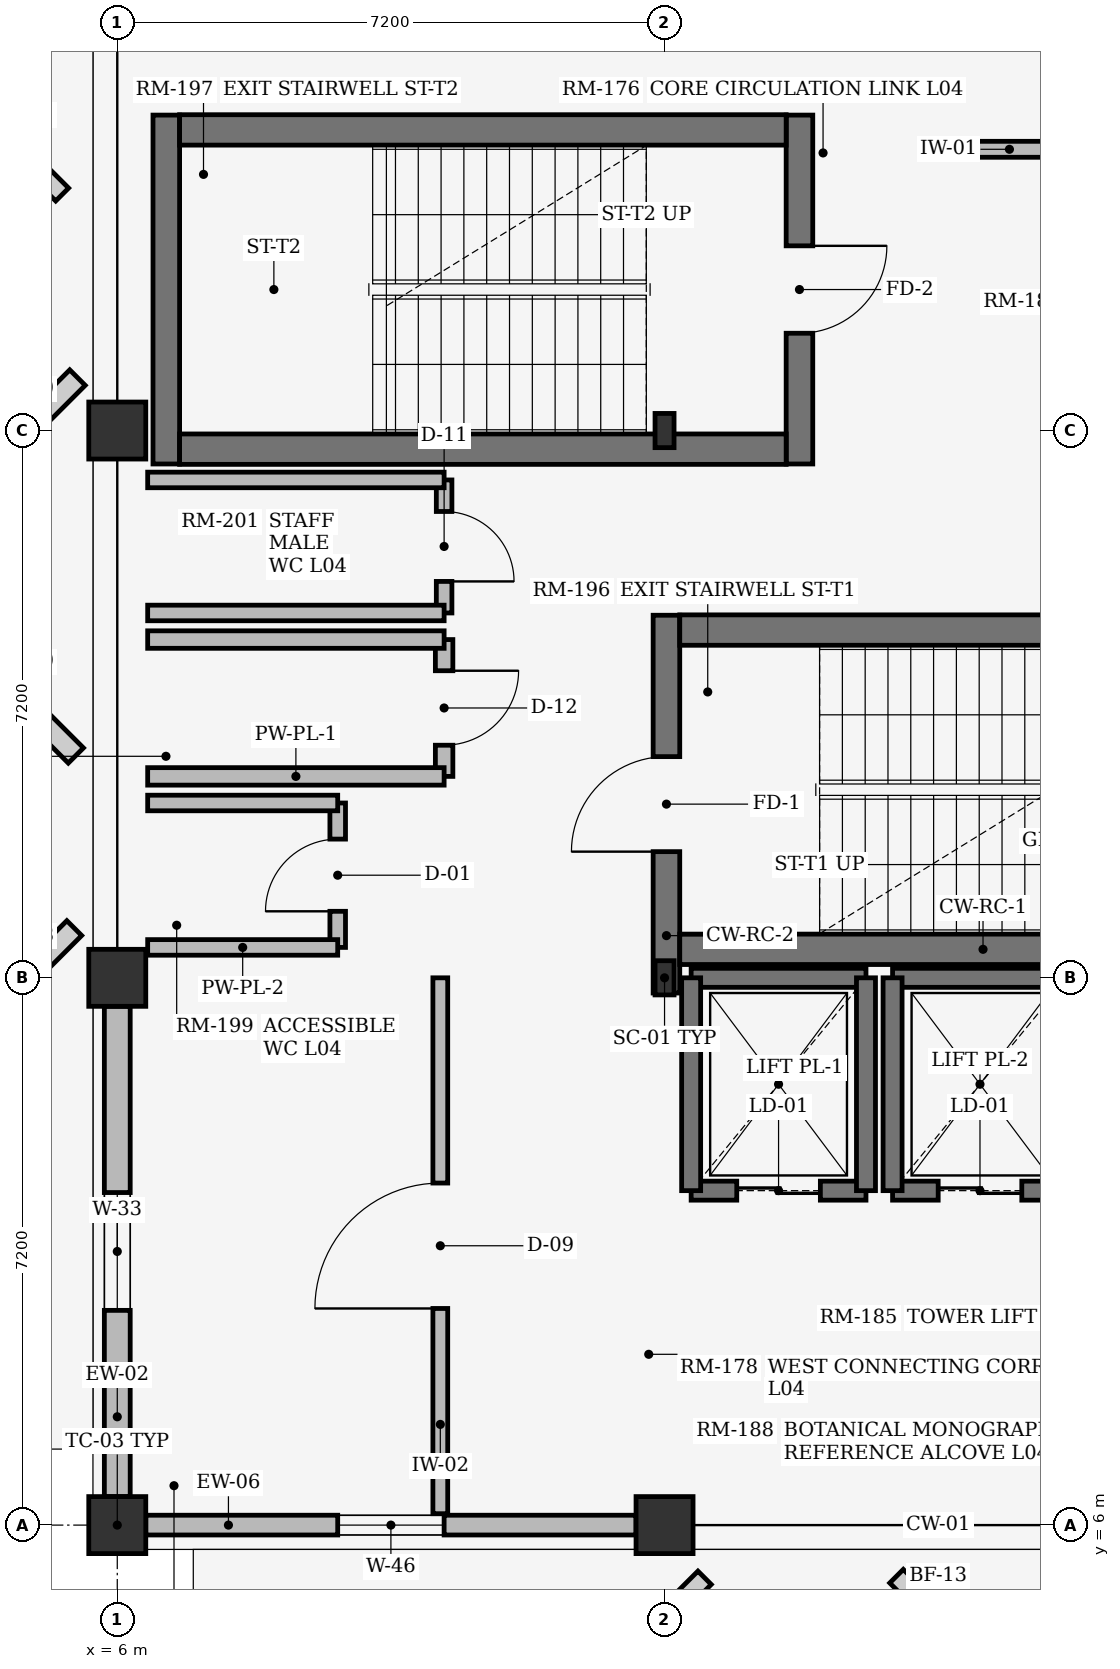
"""IFC4 building model, lengths in metres.
Left out: names, types, materials, properties, quantities, classifications, styles, units other than length and angle.
Written with IfcOpenShell. Run it as: python <this file> out.ifc"""

import sys

from ifc_helpers import new_model, si_unit, direction, frame, frame_2d, origin, origin_2d, place, context, subcontext, project, spatial, rectangle, i_section, extrude, element, fill, save


model = new_model("IFC4")
c1 = context("Model", 3, precision=1e-05, world=origin(), true_north=direction((0.0, 1.0)))
c2 = subcontext(c1, "Body", "Model", "MODEL_VIEW")
j1 = project(units=[si_unit("LENGTHUNIT", "METRE"), si_unit("PLANEANGLEUNIT", "RADIAN")], contexts=[c1])
p1 = place(None, origin())
s1 = spatial("IfcSite", under=j1, at=p1, CompositionType="ELEMENT")
p2 = place(p1, origin())
s2 = spatial("IfcBuilding", under=s1, at=p2, CompositionType="ELEMENT")
p3 = place(p2, frame((0.0, 0.0, 17.1)))
s3 = spatial("IfcBuildingStorey", under=s2, at=p3, CompositionType="ELEMENT", Elevation=17.1)
for number, where, z_axis, x_axis in (
    (1, (6.0, 6.0, 0.0), (0.0, 0.0, 1.0), (1.0, 0.0, 0.0)),
    (2, (6.0, 13.2, 0.0), (0.0, 0.0, 1.0), (1.0, 0.0, 0.0)),
    (3, (6.0, 20.4, 0.0), (0.0, 0.0, 1.0), (1.0, 0.0, 0.0)),
    (4, (13.2, 6.0, 0.0), (0.0, 0.0, 1.0), (1.0, 0.0, 0.0)),
):
    element("IfcColumn", number, at=place(p3, frame(where, z_axis=z_axis, x_axis=x_axis)), inside=s3, PredefinedType="COLUMN", context=c2, shape_type="SweptSolid", body=[
        extrude(rectangle(XDim=0.75, YDim=0.75, at=origin_2d()), origin(), (0.0, 0.0, 1.0), 3.66),
    ])
for number, where, z_axis, x_axis in (
    (5, (13.2, 13.2, 0.0), (0.0, 0.0, 1.0), (1.0, 0.0, 0.0)),
    (6, (13.2, 20.4, 0.0), (0.0, 0.0, 1.0), (1.0, 0.0, 0.0)),
):
    element("IfcColumn", number, at=place(p3, frame(where, z_axis=z_axis, x_axis=x_axis)), inside=s3, PredefinedType="COLUMN", context=c2, shape_type="SweptSolid", body=[
        extrude(i_section(OverallWidth=0.25, OverallDepth=0.45, WebThickness=0.011, FlangeThickness=0.014, at=origin_2d()), origin(), (0.0, 0.0, 1.0), 3.66),
    ])
p4 = place(p3, frame((6.375, 6.0, 0.0), z_axis=(0.0, 0.0, 1.0), x_axis=(1.0, 0.0, 0.0)))
e7 = element("IfcWall", 7, at=p4, inside=s3, PredefinedType="STANDARD", context=c2, shape_type="SweptSolid", body=[
    extrude(rectangle(XDim=6.45, YDim=0.26, at=frame_2d((3.225, 0.0))), origin(), (0.0, 0.0, 1.0), 3.04),
])
p5 = place(p4, frame((2.525, 0.0, 0.75)))
e8 = element("IfcOpeningElement", 8, at=p5, cuts=e7, PredefinedType="OPENING", context=c2, shape_type="SweptSolid", body=[
    extrude(rectangle(XDim=1.4, YDim=1.25, at=frame_2d((0.7, 0.625))), frame((0.0, 0.14, 0.0), z_axis=(0.0, -1.0, 0.0), x_axis=(1.0, 0.0, 0.0)), (0.0, 0.0, 1.0), 0.28),
])
p6 = place(p3, frame((6.0, 6.375, 0.0), z_axis=(0.0, 0.0, 1.0), x_axis=(0.0, 1.0, 0.0)))
e9 = element("IfcWall", 9, at=p6, inside=s3, PredefinedType="STANDARD", context=c2, shape_type="SweptSolid", body=[
    extrude(rectangle(XDim=6.45, YDim=0.34, at=frame_2d((3.225, 0.0))), origin(), (0.0, 0.0, 1.0), 3.04),
])
p7 = place(p6, frame((2.45, 0.0, 0.75)))
e10 = element("IfcOpeningElement", 10, at=p7, cuts=e9, PredefinedType="OPENING", context=c2, shape_type="SweptSolid", body=[
    extrude(rectangle(XDim=1.55, YDim=1.35, at=frame_2d((0.775, 0.675))), frame((0.0, 0.18, 0.0), z_axis=(0.0, -1.0, 0.0), x_axis=(1.0, 0.0, 0.0)), (0.0, 0.0, 1.0), 0.36),
])
p8 = place(p3, frame((13.225, 13.0, 0.0), z_axis=(0.0, 0.0, 1.0), x_axis=(0.0, 1.0, 0.0)))
e11 = element("IfcWall", 11, at=p8, inside=s3, PredefinedType="SHEAR", context=c2, shape_type="SweptSolid", body=[
    extrude(rectangle(XDim=4.97, YDim=0.35, at=frame_2d((2.485, 0.0))), origin(), (0.0, 0.0, 1.0), 3.66),
])
p9 = place(p8, frame((1.86, 0.0, 0.0)))
e12 = element("IfcOpeningElement", 12, at=p9, cuts=e11, PredefinedType="OPENING", context=c2, shape_type="SweptSolid", body=[
    extrude(rectangle(XDim=1.25, YDim=2.2, at=frame_2d((0.625, 1.1))), frame((0.0, 0.185, 0.0), z_axis=(0.0, -1.0, 0.0), x_axis=(1.0, 0.0, 0.0)), (0.0, 0.0, 1.0), 0.37),
])
for number, where, z_axis, x_axis in (
    (13, (13.4, 13.575, 0.0), (0.0, 0.0, 1.0), (1.0, 0.0, 0.0)),
    (14, (13.4, 17.775, 0.0), (0.0, 0.0, 1.0), (1.0, 0.0, 0.0)),
):
    element("IfcWall", number, at=place(p3, frame(where, z_axis=z_axis, x_axis=x_axis)), inside=s3, PredefinedType="SHEAR", context=c2, shape_type="SweptSolid", body=[
        extrude(rectangle(XDim=7.98, YDim=0.4, at=frame_2d((3.99, 0.0))), origin(), (0.0, 0.0, 1.0), 3.66),
    ])
p10 = place(p3, frame((14.975, 24.55, 0.0), z_axis=(0.0, 0.0, 1.0), x_axis=(0.0, -1.0, 0.0)))
e15 = element("IfcWall", 15, at=p10, inside=s3, PredefinedType="SHEAR", context=c2, shape_type="SweptSolid", body=[
    extrude(rectangle(XDim=4.59, YDim=0.35, at=frame_2d((2.295, 0.0))), origin(), (0.0, 0.0, 1.0), 3.66),
])
p11 = place(p10, frame((1.72, 0.0, 0.0)))
e16 = element("IfcOpeningElement", 16, at=p11, cuts=e15, PredefinedType="OPENING", context=c2, shape_type="SweptSolid", body=[
    extrude(rectangle(XDim=1.15, YDim=2.2, at=frame_2d((0.575, 1.1))), frame((0.0, 0.185, 0.0), z_axis=(0.0, -1.0, 0.0), x_axis=(1.0, 0.0, 0.0)), (0.0, 0.0, 1.0), 0.37),
])
p12 = place(p3, frame((6.645, 24.55, 0.0), z_axis=(0.0, 0.0, 1.0), x_axis=(0.0, -1.0, 0.0)))
e17 = element("IfcWall", 17, at=p12, inside=s3, PredefinedType="SHEAR", context=c2, shape_type="SweptSolid", body=[
    extrude(rectangle(XDim=4.59, YDim=0.35, at=frame_2d((2.295, 0.0))), origin(), (0.0, 0.0, 1.0), 3.66),
])
for number, where, z_axis, x_axis in (
    (18, (14.8, 24.355, 0.0), (0.0, 0.0, 1.0), (-1.0, 0.0, 0.0)),
    (19, (14.8, 20.155, 0.0), (0.0, 0.0, 1.0), (-1.0, 0.0, 0.0)),
):
    element("IfcWall", number, at=place(p3, frame(where, z_axis=z_axis, x_axis=x_axis)), inside=s3, PredefinedType="SHEAR", context=c2, shape_type="SweptSolid", body=[
        extrude(rectangle(XDim=7.98, YDim=0.4, at=frame_2d((3.99, 0.0))), origin(), (0.0, 0.0, 1.0), 3.66),
    ])
p13 = place(p3, frame((13.55, 10.4, 0.0), z_axis=(0.0, 0.0, 1.0), x_axis=(1.0, 0.0, 0.0)))
e20 = element("IfcWall", 20, at=p13, inside=s3, PredefinedType="SHEAR", context=c2, shape_type="SweptSolid", body=[
    extrude(rectangle(XDim=2.3, YDim=0.25, at=frame_2d((1.15, 0.0))), origin(), (0.0, 0.0, 1.0), 3.66),
])
p14 = place(p13, frame((0.6, 0.0, 0.0)))
e21 = element("IfcOpeningElement", 21, at=p14, cuts=e20, PredefinedType="OPENING", context=c2, shape_type="SweptSolid", body=[
    extrude(rectangle(XDim=1.1, YDim=2.2, at=frame_2d((0.55, 1.1))), frame((0.0, 0.135, 0.0), z_axis=(0.0, -1.0, 0.0), x_axis=(1.0, 0.0, 0.0)), (0.0, 0.0, 1.0), 0.27),
])
p15 = place(p3, frame((13.55, 13.2, 0.0), z_axis=(0.0, 0.0, 1.0), x_axis=(1.0, 0.0, 0.0)))
e22 = element("IfcWall", 22, at=p15, inside=s3, PredefinedType="SHEAR", context=c2, shape_type="SweptSolid", body=[
    extrude(rectangle(XDim=2.3, YDim=0.25, at=frame_2d((1.15, 0.0))), origin(), (0.0, 0.0, 1.0), 3.66),
])
for number, where, z_axis, x_axis in (
    (23, (13.55, 10.4, 0.0), (0.0, 0.0, 1.0), (0.0, 1.0, 0.0)),
    (24, (15.85, 10.4, 0.0), (0.0, 0.0, 1.0), (0.0, 1.0, 0.0)),
):
    element("IfcWall", number, at=place(p3, frame(where, z_axis=z_axis, x_axis=x_axis)), inside=s3, PredefinedType="SHEAR", context=c2, shape_type="SweptSolid", body=[
        extrude(rectangle(XDim=2.8, YDim=0.25, at=frame_2d((1.4, 0.0))), origin(), (0.0, 0.0, 1.0), 3.66),
    ])
p16 = place(p3, frame((16.2, 10.4, 0.0), z_axis=(0.0, 0.0, 1.0), x_axis=(1.0, 0.0, 0.0)))
e25 = element("IfcWall", 25, at=p16, inside=s3, PredefinedType="SHEAR", context=c2, shape_type="SweptSolid", body=[
    extrude(rectangle(XDim=2.3, YDim=0.25, at=frame_2d((1.15, 0.0))), origin(), (0.0, 0.0, 1.0), 3.66),
])
p17 = place(p16, frame((0.6, 0.0, 0.0)))
e26 = element("IfcOpeningElement", 26, at=p17, cuts=e25, PredefinedType="OPENING", context=c2, shape_type="SweptSolid", body=[
    extrude(rectangle(XDim=1.1, YDim=2.2, at=frame_2d((0.55, 1.1))), frame((0.0, 0.135, 0.0), z_axis=(0.0, -1.0, 0.0), x_axis=(1.0, 0.0, 0.0)), (0.0, 0.0, 1.0), 0.27),
])
p18 = place(p3, frame((16.2, 13.2, 0.0), z_axis=(0.0, 0.0, 1.0), x_axis=(1.0, 0.0, 0.0)))
e27 = element("IfcWall", 27, at=p18, inside=s3, PredefinedType="SHEAR", context=c2, shape_type="SweptSolid", body=[
    extrude(rectangle(XDim=2.3, YDim=0.25, at=frame_2d((1.15, 0.0))), origin(), (0.0, 0.0, 1.0), 3.66),
])
p19 = place(p3, frame((16.2, 10.4, 0.0), z_axis=(0.0, 0.0, 1.0), x_axis=(0.0, 1.0, 0.0)))
e28 = element("IfcWall", 28, at=p19, inside=s3, PredefinedType="SHEAR", context=c2, shape_type="SweptSolid", body=[
    extrude(rectangle(XDim=2.8, YDim=0.25, at=frame_2d((1.4, 0.0))), origin(), (0.0, 0.0, 1.0), 3.66),
])
p20 = place(p3, frame((8.9, 13.6, 0.0), z_axis=(0.0, 0.0, 1.0), x_axis=(0.0, 1.0, 0.0)))
e29 = element("IfcWall", 29, at=p20, inside=s3, PredefinedType="PLUMBINGWALL", context=c2, shape_type="SweptSolid", body=[
    extrude(rectangle(XDim=1.9, YDim=0.205, at=frame_2d((0.95, 0.0))), origin(), (0.0, 0.0, 1.0), 3.64),
])
p21 = place(p20, frame((0.475, 0.0, 0.0)))
e30 = element("IfcOpeningElement", 30, at=p21, cuts=e29, PredefinedType="OPENING", context=c2, shape_type="SweptSolid", body=[
    extrude(rectangle(XDim=0.95, YDim=2.15, at=frame_2d((0.475, 1.075))), frame((0.0, 0.113, 0.0), z_axis=(0.0, -1.0, 0.0), x_axis=(1.0, 0.0, 0.0)), (0.0, 0.0, 1.0), 0.225),
])
for number, where, z_axis, x_axis in (
    (31, (6.4, 13.6, 0.0), (0.0, 0.0, 1.0), (1.0, 0.0, 0.0)),
    (32, (6.4, 15.5, 0.0), (0.0, 0.0, 1.0), (1.0, 0.0, 0.0)),
):
    element("IfcWall", number, at=place(p3, frame(where, z_axis=z_axis, x_axis=x_axis)), inside=s3, PredefinedType="PLUMBINGWALL", context=c2, shape_type="SweptSolid", body=[
        extrude(rectangle(XDim=2.5, YDim=0.205, at=frame_2d((1.25, 0.0))), origin(), (0.0, 0.0, 1.0), 3.64),
    ])
p22 = place(p3, frame((10.3, 15.85, 0.0), z_axis=(0.0, 0.0, 1.0), x_axis=(0.0, 1.0, 0.0)))
e33 = element("IfcWall", 33, at=p22, inside=s3, PredefinedType="PLUMBINGWALL", context=c2, shape_type="SweptSolid", body=[
    extrude(rectangle(XDim=1.8, YDim=0.23, at=frame_2d((0.9, 0.0))), origin(), (0.0, 0.0, 1.0), 3.64),
])
p23 = place(p22, frame((0.41, 0.0, 0.0)))
e34 = element("IfcOpeningElement", 34, at=p23, cuts=e33, PredefinedType="OPENING", context=c2, shape_type="SweptSolid", body=[
    extrude(rectangle(XDim=0.98, YDim=2.1, at=frame_2d((0.49, 1.05))), frame((0.0, 0.125, 0.0), z_axis=(0.0, -1.0, 0.0), x_axis=(1.0, 0.0, 0.0)), (0.0, 0.0, 1.0), 0.25),
])
for number, where, z_axis, x_axis in (
    (35, (6.4, 15.85, 0.0), (0.0, 0.0, 1.0), (1.0, 0.0, 0.0)),
    (36, (6.4, 17.65, 0.0), (0.0, 0.0, 1.0), (1.0, 0.0, 0.0)),
):
    element("IfcWall", number, at=place(p3, frame(where, z_axis=z_axis, x_axis=x_axis)), inside=s3, PredefinedType="PLUMBINGWALL", context=c2, shape_type="SweptSolid", body=[
        extrude(rectangle(XDim=3.9, YDim=0.23, at=frame_2d((1.95, 0.0))), origin(), (0.0, 0.0, 1.0), 3.64),
    ])
p24 = place(p3, frame((10.3, 18.0, 0.0), z_axis=(0.0, 0.0, 1.0), x_axis=(0.0, 1.0, 0.0)))
e37 = element("IfcWall", 37, at=p24, inside=s3, PredefinedType="PLUMBINGWALL", context=c2, shape_type="SweptSolid", body=[
    extrude(rectangle(XDim=1.75, YDim=0.205, at=frame_2d((0.875, 0.0))), origin(), (0.0, 0.0, 1.0), 3.64),
])
p25 = place(p24, frame((0.415, 0.0, 0.0)))
e38 = element("IfcOpeningElement", 38, at=p25, cuts=e37, PredefinedType="OPENING", context=c2, shape_type="SweptSolid", body=[
    extrude(rectangle(XDim=0.92, YDim=2.1, at=frame_2d((0.46, 1.05))), frame((0.0, 0.113, 0.0), z_axis=(0.0, -1.0, 0.0), x_axis=(1.0, 0.0, 0.0)), (0.0, 0.0, 1.0), 0.225),
])
for number, where, z_axis, x_axis in (
    (39, (6.4, 18.0, 0.0), (0.0, 0.0, 1.0), (1.0, 0.0, 0.0)),
    (40, (6.4, 19.75, 0.0), (0.0, 0.0, 1.0), (1.0, 0.0, 0.0)),
):
    element("IfcWall", number, at=place(p3, frame(where, z_axis=z_axis, x_axis=x_axis)), inside=s3, PredefinedType="PLUMBINGWALL", context=c2, shape_type="SweptSolid", body=[
        extrude(rectangle(XDim=3.9, YDim=0.205, at=frame_2d((1.95, 0.0))), origin(), (0.0, 0.0, 1.0), 3.64),
    ])
p26 = place(p3, frame((17.3, 24.1, 0.0), z_axis=(0.0, 0.0, 1.0), x_axis=(1.0, 0.0, 0.0)))
e41 = element("IfcWall", 41, at=p26, inside=s3, PredefinedType="PARTITIONING", context=c2, shape_type="SweptSolid", body=[
    extrude(rectangle(XDim=4.0, YDim=0.21, at=frame_2d((2.0, 0.0))), origin(), (0.0, 0.0, 1.0), 3.64),
])
p27 = place(p26, frame((1.225, 0.0, 0.0)))
e42 = element("IfcOpeningElement", 42, at=p27, cuts=e41, PredefinedType="OPENING", context=c2, shape_type="SweptSolid", body=[
    extrude(rectangle(XDim=1.55, YDim=2.25, at=frame_2d((0.775, 1.125))), frame((0.0, 0.115, 0.0), z_axis=(0.0, -1.0, 0.0), x_axis=(1.0, 0.0, 0.0)), (0.0, 0.0, 1.0), 0.23),
])
p28 = place(p3, frame((10.25, 6.15, 0.0), z_axis=(0.0, 0.0, 1.0), x_axis=(0.0, 1.0, 0.0)))
e43 = element("IfcWall", 43, at=p28, inside=s3, PredefinedType="PARTITIONING", context=c2, shape_type="SweptSolid", body=[
    extrude(rectangle(XDim=7.05, YDim=0.195, at=frame_2d((3.525, 0.0))), origin(), (0.0, 0.0, 1.0), 3.64),
])
p29 = place(p28, frame((2.7, 0.0, 0.0)))
e44 = element("IfcOpeningElement", 44, at=p29, cuts=e43, PredefinedType="OPENING", context=c2, shape_type="SweptSolid", body=[
    extrude(rectangle(XDim=1.65, YDim=2.25, at=frame_2d((0.825, 1.125))), frame((0.0, 0.107, 0.0), z_axis=(0.0, -1.0, 0.0), x_axis=(1.0, 0.0, 0.0)), (0.0, 0.0, 1.0), 0.215),
])
p30 = place(p5, origin())
e45 = element("IfcWindow", 45, at=p30, inside=s3, PartitioningType="SINGLE_PANEL", PredefinedType="WINDOW", context=c2, shape_type="SweptSolid", body=[
    extrude(rectangle(XDim=1.4, YDim=1.25, at=frame_2d((0.7, 0.625))), frame((0.0, 0.03, 0.0), z_axis=(0.0, -1.0, 0.0), x_axis=(1.0, 0.0, 0.0)), (0.0, 0.0, 1.0), 0.06),
])
fill(e8, e45)
p31 = place(p7, origin())
e46 = element("IfcWindow", 46, at=p31, inside=s3, PartitioningType="SINGLE_PANEL", PredefinedType="WINDOW", context=c2, shape_type="SweptSolid", body=[
    extrude(rectangle(XDim=1.55, YDim=1.35, at=frame_2d((0.775, 0.675))), frame((0.0, 0.03, 0.0), z_axis=(0.0, -1.0, 0.0), x_axis=(1.0, 0.0, 0.0)), (0.0, 0.0, 1.0), 0.06),
])
fill(e10, e46)
p32 = place(p9, origin())
e47 = element("IfcDoor", 47, at=p32, inside=s3, OperationType="SINGLE_SWING_LEFT", PredefinedType="DOOR", context=c2, shape_type="SweptSolid", body=[
    extrude(rectangle(XDim=1.25, YDim=2.2, at=frame_2d((0.625, 1.1))), frame((0.0, 0.025, 0.0), z_axis=(0.0, -1.0, 0.0), x_axis=(1.0, 0.0, 0.0)), (0.0, 0.0, 1.0), 0.05),
])
fill(e12, e47)
p33 = place(p11, origin())
e48 = element("IfcDoor", 48, at=p33, inside=s3, OperationType="SINGLE_SWING_LEFT", PredefinedType="DOOR", context=c2, shape_type="SweptSolid", body=[
    extrude(rectangle(XDim=1.15, YDim=2.2, at=frame_2d((0.575, 1.1))), frame((0.0, 0.025, 0.0), z_axis=(0.0, -1.0, 0.0), x_axis=(1.0, 0.0, 0.0)), (0.0, 0.0, 1.0), 0.05),
])
fill(e16, e48)
p34 = place(p14, origin())
e49 = element("IfcDoor", 49, at=p34, inside=s3, OperationType="DOUBLE_DOOR_SLIDING", PredefinedType="DOOR", context=c2, shape_type="SweptSolid", body=[
    extrude(rectangle(XDim=1.1, YDim=2.2, at=frame_2d((0.55, 1.1))), frame((0.0, 0.025, 0.0), z_axis=(0.0, -1.0, 0.0), x_axis=(1.0, 0.0, 0.0)), (0.0, 0.0, 1.0), 0.05),
])
fill(e21, e49)
p35 = place(p17, origin())
e50 = element("IfcDoor", 50, at=p35, inside=s3, OperationType="DOUBLE_DOOR_SLIDING", PredefinedType="DOOR", context=c2, shape_type="SweptSolid", body=[
    extrude(rectangle(XDim=1.1, YDim=2.2, at=frame_2d((0.55, 1.1))), frame((0.0, 0.025, 0.0), z_axis=(0.0, -1.0, 0.0), x_axis=(1.0, 0.0, 0.0)), (0.0, 0.0, 1.0), 0.05),
])
fill(e26, e50)
p36 = place(p21, origin())
e51 = element("IfcDoor", 51, at=p36, inside=s3, OperationType="SINGLE_SWING_LEFT", PredefinedType="DOOR", context=c2, shape_type="SweptSolid", body=[
    extrude(rectangle(XDim=0.95, YDim=2.15, at=frame_2d((0.475, 1.075))), frame((0.0, 0.025, 0.0), z_axis=(0.0, -1.0, 0.0), x_axis=(1.0, 0.0, 0.0)), (0.0, 0.0, 1.0), 0.05),
])
fill(e30, e51)
p37 = place(p23, origin())
e52 = element("IfcDoor", 52, at=p37, inside=s3, OperationType="SINGLE_SWING_RIGHT", PredefinedType="DOOR", context=c2, shape_type="SweptSolid", body=[
    extrude(rectangle(XDim=0.98, YDim=2.1, at=frame_2d((0.49, 1.05))), frame((0.0, 0.025, 0.0), z_axis=(0.0, -1.0, 0.0), x_axis=(1.0, 0.0, 0.0)), (0.0, 0.0, 1.0), 0.05),
])
fill(e34, e52)
p38 = place(p25, frame((0.92, 0.0, 0.0), z_axis=(0.0, 0.0, 1.0), x_axis=(-1.0, 0.0, 0.0)))
e53 = element("IfcDoor", 53, at=p38, inside=s3, OperationType="SINGLE_SWING_LEFT", PredefinedType="DOOR", context=c2, shape_type="SweptSolid", body=[
    extrude(rectangle(XDim=0.92, YDim=2.1, at=frame_2d((0.46, 1.05))), frame((0.0, 0.025, 0.0), z_axis=(0.0, -1.0, 0.0), x_axis=(1.0, 0.0, 0.0)), (0.0, 0.0, 1.0), 0.05),
])
fill(e38, e53)
p39 = place(p29, origin())
e54 = element("IfcDoor", 54, at=p39, inside=s3, OperationType="DOUBLE_DOOR_SINGLE_SWING", PredefinedType="DOOR", context=c2, shape_type="SweptSolid", body=[
    extrude(rectangle(XDim=1.65, YDim=2.25, at=frame_2d((0.825, 1.125))), frame((0.0, 0.025, 0.0), z_axis=(0.0, -1.0, 0.0), x_axis=(1.0, 0.0, 0.0)), (0.0, 0.0, 1.0), 0.05),
])
fill(e44, e54)
save(model, sys.argv[1])
